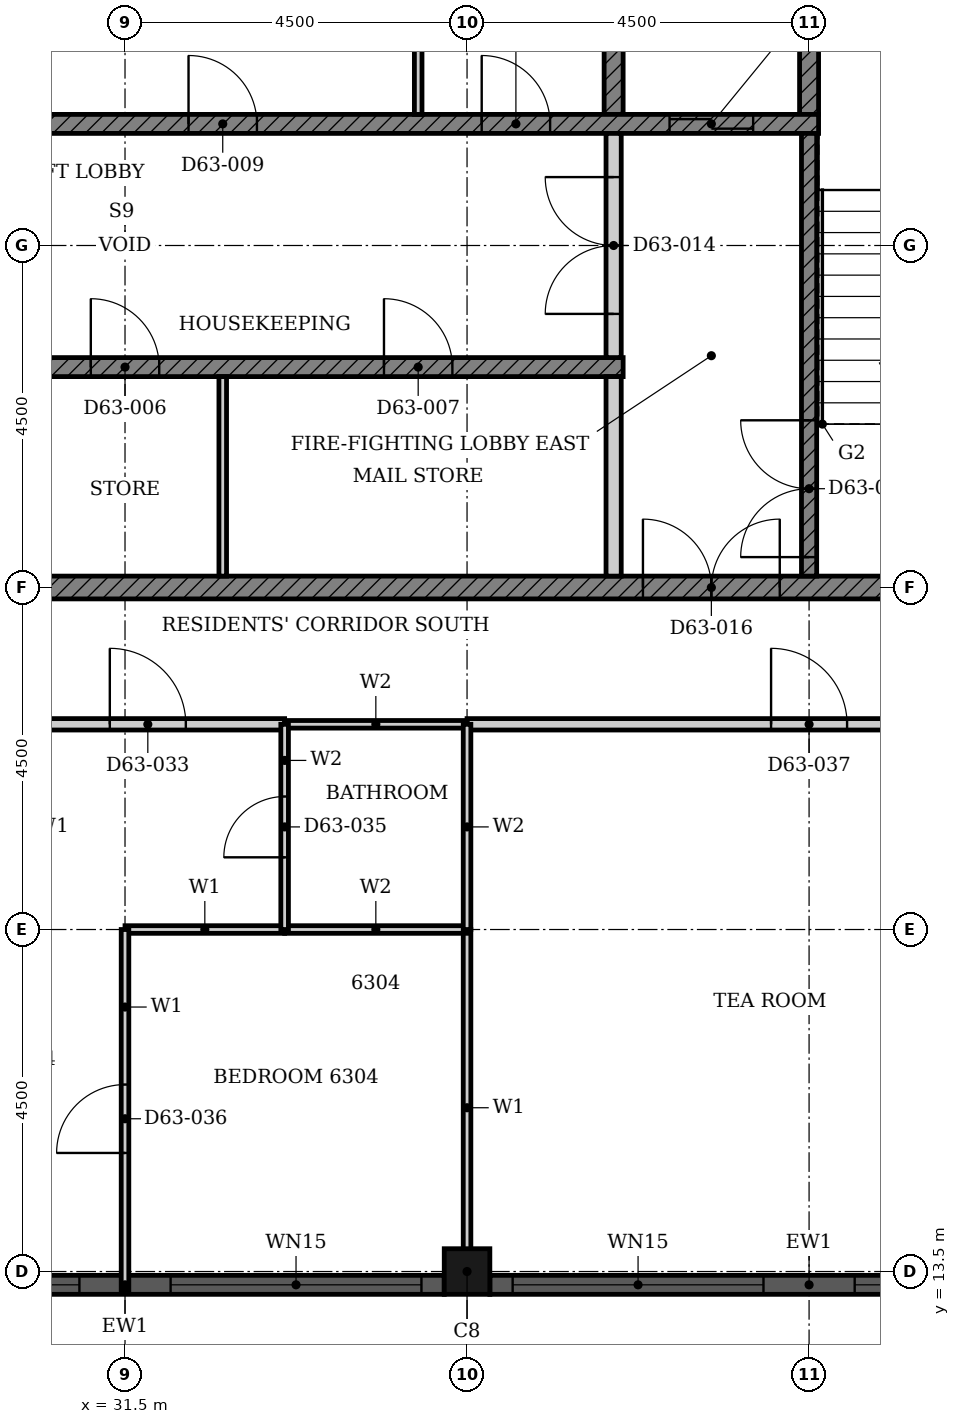
"""IFC4 building model, lengths in metres.
Left out: names, types, materials, properties, quantities, classifications, styles, units other than length and angle.
Written with IfcOpenShell. Run it as: python <this file> out.ifc"""

import sys

from ifc_helpers import new_model, si_unit, direction, frame, frame_2d, origin, origin_2d, place, context, subcontext, project, spatial, polyline, rectangle, hollow_rectangle, outline, extrude, element, fill, save


model = new_model("IFC4")
c1 = context("Model", 3, precision=1e-05, world=origin(), true_north=direction((0.0, 1.0)))
c2 = subcontext(c1, "Body", "Model", "MODEL_VIEW")
j1 = project(units=[si_unit("LENGTHUNIT", "METRE"), si_unit("PLANEANGLEUNIT", "RADIAN")], contexts=[c1])
p1 = place(None, origin())
s1 = spatial("IfcSite", under=j1, at=p1, CompositionType="ELEMENT")
p2 = place(p1, origin())
s2 = spatial("IfcBuilding", under=s1, at=p2, CompositionType="ELEMENT")
p3 = place(p2, frame((0.0, 0.0, 249.0)))
s3 = spatial("IfcBuildingStorey", under=s2, at=p3, CompositionType="ELEMENT", Elevation=249.0)
p4 = place(p3, frame((36.0, 13.5, 0.0), z_axis=(0.0, 0.0, 1.0), x_axis=(1.0, 0.0, 0.0)))
e1 = element("IfcColumn", 1, at=p4, inside=s3, PredefinedType="COLUMN", context=c2, shape_type="SweptSolid", body=[
    extrude(hollow_rectangle(XDim=0.6, YDim=0.6, WallThickness=0.02, at=origin_2d()), origin(), (0.0, 0.0, 1.0), 3.7),
])
p5 = place(p3, frame((27.3, 13.325, 0.0), z_axis=(0.0, 0.0, 1.0), x_axis=(1.0, 0.0, 0.0)))
e2 = element("IfcWall", 2, at=p5, inside=s3, PredefinedType="SOLIDWALL", context=c2, shape_type="SweptSolid", body=[
    extrude(rectangle(XDim=8.4, YDim=0.25, at=frame_2d((4.2, 0.0))), origin(), (0.0, 0.0, 1.0), 3.7),
])
p6 = place(p5, frame((0.3, 0.0, 0.45)))
e3 = element("IfcOpeningElement", 3, at=p6, cuts=e2, PredefinedType="OPENING", context=c2, shape_type="SweptSolid", body=[
    extrude(rectangle(XDim=3.3, YDim=2.3, at=frame_2d((1.65, 1.15))), frame((0.0, 0.135, 0.0), z_axis=(0.0, -1.0, 0.0), x_axis=(1.0, 0.0, 0.0)), (0.0, 0.0, 1.0), 0.27),
])
p7 = place(p5, frame((4.8, 0.0, 0.45)))
e4 = element("IfcOpeningElement", 4, at=p7, cuts=e2, PredefinedType="OPENING", context=c2, shape_type="SweptSolid", body=[
    extrude(rectangle(XDim=3.3, YDim=2.3, at=frame_2d((1.65, 1.15))), frame((0.0, 0.135, 0.0), z_axis=(0.0, -1.0, 0.0), x_axis=(1.0, 0.0, 0.0)), (0.0, 0.0, 1.0), 0.27),
])
p8 = place(p3, frame((36.3, 13.325, 0.0), z_axis=(0.0, 0.0, 1.0), x_axis=(1.0, 0.0, 0.0)))
e5 = element("IfcWall", 5, at=p8, inside=s3, PredefinedType="SOLIDWALL", context=c2, shape_type="SweptSolid", body=[
    extrude(rectangle(XDim=8.4, YDim=0.25, at=frame_2d((4.2, 0.0))), origin(), (0.0, 0.0, 1.0), 3.7),
])
p9 = place(p8, frame((0.3, 0.0, 0.45)))
e6 = element("IfcOpeningElement", 6, at=p9, cuts=e5, PredefinedType="OPENING", context=c2, shape_type="SweptSolid", body=[
    extrude(rectangle(XDim=3.3, YDim=2.3, at=frame_2d((1.65, 1.15))), frame((0.0, 0.135, 0.0), z_axis=(0.0, -1.0, 0.0), x_axis=(1.0, 0.0, 0.0)), (0.0, 0.0, 1.0), 0.27),
])
p10 = place(p8, frame((4.8, 0.0, 0.45)))
e7 = element("IfcOpeningElement", 7, at=p10, cuts=e5, PredefinedType="OPENING", context=c2, shape_type="SweptSolid", body=[
    extrude(rectangle(XDim=3.3, YDim=2.3, at=frame_2d((1.65, 1.15))), frame((0.0, 0.135, 0.0), z_axis=(0.0, -1.0, 0.0), x_axis=(1.0, 0.0, 0.0)), (0.0, 0.0, 1.0), 0.27),
])
p11 = place(p3, origin())
e8 = element("IfcWall", 8, at=p11, inside=s3, PredefinedType="SHEAR", context=c2, shape_type="SweptSolid", body=[
    extrude(outline(polyline([(37.803, 28.725), (38.053, 28.725), (38.053, 31.35), (40.375, 31.35), (40.375, 28.725), (40.625, 28.725), (40.625, 31.65), (37.803, 31.65), (37.803, 28.725)])), origin(), (0.0, 0.0, 1.0), 3.4),
])
p12 = place(p3, frame((30.339, 22.5, 0.0), z_axis=(0.0, 0.0, 1.0), x_axis=(1.0, 0.0, 0.0)))
e9 = element("IfcWall", 9, at=p12, inside=s3, PredefinedType="SHEAR", context=c2, shape_type="SweptSolid", body=[
    extrude(rectangle(XDim=14.511, YDim=0.3, at=frame_2d((7.255, 0.0))), origin(), (0.0, 0.0, 1.0), 3.4),
])
p13 = place(p12, frame((7.975, 0.0, 0.0)))
e10 = element("IfcOpeningElement", 10, at=p13, cuts=e9, PredefinedType="OPENING", context=c2, shape_type="SweptSolid", body=[
    extrude(rectangle(XDim=1.8, YDim=2.1, at=frame_2d((0.9, 1.05))), frame((0.0, 0.16, 0.0), z_axis=(0.0, -1.0, 0.0), x_axis=(1.0, 0.0, 0.0)), (0.0, 0.0, 1.0), 0.32),
])
p14 = place(p3, frame((22.375, 25.4, 0.0), z_axis=(0.0, 0.0, 1.0), x_axis=(1.0, 0.0, 0.0)))
e11 = element("IfcWall", 11, at=p14, inside=s3, PredefinedType="SHEAR", context=c2, shape_type="SweptSolid", body=[
    extrude(rectangle(XDim=15.678, YDim=0.25, at=frame_2d((7.839, 0.0))), origin(), (0.0, 0.0, 1.0), 3.4),
])
p15 = place(p14, frame((6.004, 0.0, 0.0)))
e12 = element("IfcOpeningElement", 12, at=p15, cuts=e11, PredefinedType="OPENING", context=c2, shape_type="SweptSolid", body=[
    extrude(rectangle(XDim=1.1, YDim=2.1, at=frame_2d((0.55, 1.05))), frame((0.0, 0.135, 0.0), z_axis=(0.0, -1.0, 0.0), x_axis=(1.0, 0.0, 0.0)), (0.0, 0.0, 1.0), 0.27),
])
p16 = place(p14, frame((0.861, 0.0, 0.0)))
e13 = element("IfcOpeningElement", 13, at=p16, cuts=e11, PredefinedType="OPENING", context=c2, shape_type="SweptSolid", body=[
    extrude(rectangle(XDim=1.1, YDim=2.1, at=frame_2d((0.55, 1.05))), frame((0.0, 0.135, 0.0), z_axis=(0.0, -1.0, 0.0), x_axis=(1.0, 0.0, 0.0)), (0.0, 0.0, 1.0), 0.27),
])
p17 = place(p14, frame((3.532, 0.0, 0.0)))
e14 = element("IfcOpeningElement", 14, at=p17, cuts=e11, PredefinedType="OPENING", context=c2, shape_type="SweptSolid", body=[
    extrude(rectangle(XDim=0.9, YDim=2.1, at=frame_2d((0.45, 1.05))), frame((0.0, 0.135, 0.0), z_axis=(0.0, -1.0, 0.0), x_axis=(1.0, 0.0, 0.0)), (0.0, 0.0, 1.0), 0.27),
])
p18 = place(p14, frame((8.675, 0.0, 0.0)))
e15 = element("IfcOpeningElement", 15, at=p18, cuts=e11, PredefinedType="OPENING", context=c2, shape_type="SweptSolid", body=[
    extrude(rectangle(XDim=0.9, YDim=2.1, at=frame_2d((0.45, 1.05))), frame((0.0, 0.135, 0.0), z_axis=(0.0, -1.0, 0.0), x_axis=(1.0, 0.0, 0.0)), (0.0, 0.0, 1.0), 0.27),
])
p19 = place(p14, frame((12.532, 0.0, 0.0)))
e16 = element("IfcOpeningElement", 16, at=p19, cuts=e11, PredefinedType="OPENING", context=c2, shape_type="SweptSolid", body=[
    extrude(rectangle(XDim=0.9, YDim=2.1, at=frame_2d((0.45, 1.05))), frame((0.0, 0.135, 0.0), z_axis=(0.0, -1.0, 0.0), x_axis=(1.0, 0.0, 0.0)), (0.0, 0.0, 1.0), 0.27),
])
p20 = place(p3, frame((24.947, 28.6, 0.0), z_axis=(0.0, 0.0, 1.0), x_axis=(1.0, 0.0, 0.0)))
e17 = element("IfcWall", 17, at=p20, inside=s3, PredefinedType="SHEAR", context=c2, shape_type="SweptSolid", body=[
    extrude(rectangle(XDim=15.678, YDim=0.25, at=frame_2d((7.839, 0.0))), origin(), (0.0, 0.0, 1.0), 3.4),
])
p21 = place(p20, frame((3.432, 0.0, 0.0)))
e18 = element("IfcOpeningElement", 18, at=p21, cuts=e17, PredefinedType="OPENING", context=c2, shape_type="SweptSolid", body=[
    extrude(rectangle(XDim=1.1, YDim=2.1, at=frame_2d((0.55, 1.05))), frame((0.0, 0.135, 0.0), z_axis=(0.0, -1.0, 0.0), x_axis=(1.0, 0.0, 0.0)), (0.0, 0.0, 1.0), 0.27),
])
p22 = place(p20, frame((13.718, 0.0, 0.0)))
e19 = element("IfcOpeningElement", 19, at=p22, cuts=e17, PredefinedType="OPENING", context=c2, shape_type="SweptSolid", body=[
    extrude(rectangle(XDim=1.1, YDim=2.1, at=frame_2d((0.55, 1.05))), frame((0.0, 0.135, 0.0), z_axis=(0.0, -1.0, 0.0), x_axis=(1.0, 0.0, 0.0)), (0.0, 0.0, 1.0), 0.27),
])
p23 = place(p20, frame((0.961, 0.0, 0.0)))
e20 = element("IfcOpeningElement", 20, at=p23, cuts=e17, PredefinedType="OPENING", context=c2, shape_type="SweptSolid", body=[
    extrude(rectangle(XDim=0.9, YDim=2.1, at=frame_2d((0.45, 1.05))), frame((0.0, 0.135, 0.0), z_axis=(0.0, -1.0, 0.0), x_axis=(1.0, 0.0, 0.0)), (0.0, 0.0, 1.0), 0.27),
])
p24 = place(p20, frame((7.389, 0.0, 0.0)))
e21 = element("IfcOpeningElement", 21, at=p24, cuts=e17, PredefinedType="OPENING", context=c2, shape_type="SweptSolid", body=[
    extrude(rectangle(XDim=0.9, YDim=2.1, at=frame_2d((0.45, 1.05))), frame((0.0, 0.135, 0.0), z_axis=(0.0, -1.0, 0.0), x_axis=(1.0, 0.0, 0.0)), (0.0, 0.0, 1.0), 0.27),
])
p25 = place(p20, frame((11.246, 0.0, 0.0)))
e22 = element("IfcOpeningElement", 22, at=p25, cuts=e17, PredefinedType="OPENING", context=c2, shape_type="SweptSolid", body=[
    extrude(rectangle(XDim=0.9, YDim=2.1, at=frame_2d((0.45, 1.05))), frame((0.0, 0.135, 0.0), z_axis=(0.0, -1.0, 0.0), x_axis=(1.0, 0.0, 0.0)), (0.0, 0.0, 1.0), 0.27),
])
p26 = place(p3, frame((37.928, 22.65, 0.0), z_axis=(0.0, 0.0, 1.0), x_axis=(0.0, 1.0, 0.0)))
e23 = element("IfcWall", 23, at=p26, inside=s3, PredefinedType="PARTITIONING", context=c2, shape_type="SweptSolid", body=[
    extrude(rectangle(XDim=2.625, YDim=0.2, at=frame_2d((1.312, 0.0))), origin(), (0.0, 0.0, 1.0), 3.4),
])
for number, where, z_axis, x_axis in (
    (24, (32.786, 22.65, 0.0), (0.0, 0.0, 1.0), (0.0, 1.0, 0.0)),
    (25, (35.357, 28.725, 0.0), (0.0, 0.0, 1.0), (0.0, 1.0, 0.0)),
):
    element("IfcWall", number, at=place(p3, frame(where, z_axis=z_axis, x_axis=x_axis)), inside=s3, PredefinedType="PARTITIONING", context=c2, shape_type="SweptSolid", body=[
        extrude(rectangle(XDim=2.625, YDim=0.1, at=frame_2d((1.312, 0.0))), origin(), (0.0, 0.0, 1.0), 3.4),
    ])
p27 = place(p3, frame((40.5, 22.65, 0.0), z_axis=(0.0, 0.0, 1.0), x_axis=(0.0, 1.0, 0.0)))
e26 = element("IfcWall", 26, at=p27, inside=s3, PredefinedType="SHEAR", context=c2, shape_type="SweptSolid", body=[
    extrude(rectangle(XDim=5.825, YDim=0.2, at=frame_2d((2.913, 0.0))), origin(), (0.0, 0.0, 1.0), 3.4),
])
p28 = place(p27, frame((0.25, 0.0, 0.0)))
e27 = element("IfcOpeningElement", 27, at=p28, cuts=e26, PredefinedType="OPENING", context=c2, shape_type="SweptSolid", body=[
    extrude(rectangle(XDim=1.8, YDim=2.1, at=frame_2d((0.9, 1.05))), frame((0.0, 0.11, 0.0), z_axis=(0.0, -1.0, 0.0), x_axis=(1.0, 0.0, 0.0)), (0.0, 0.0, 1.0), 0.22),
])
p29 = place(p3, frame((37.928, 25.525, 0.0), z_axis=(0.0, 0.0, 1.0), x_axis=(0.0, 1.0, 0.0)))
e28 = element("IfcWall", 28, at=p29, inside=s3, PredefinedType="PARTITIONING", context=c2, shape_type="SweptSolid", body=[
    extrude(rectangle(XDim=2.95, YDim=0.2, at=frame_2d((1.475, 0.0))), origin(), (0.0, 0.0, 1.0), 3.4),
])
p30 = place(p29, frame((0.575, 0.0, 0.0)))
e29 = element("IfcOpeningElement", 29, at=p30, cuts=e28, PredefinedType="OPENING", context=c2, shape_type="SweptSolid", body=[
    extrude(rectangle(XDim=1.8, YDim=2.1, at=frame_2d((0.9, 1.05))), frame((0.0, 0.11, 0.0), z_axis=(0.0, -1.0, 0.0), x_axis=(1.0, 0.0, 0.0)), (0.0, 0.0, 1.0), 0.22),
])
p31 = place(p3, frame((27.0, 20.7, 0.0), z_axis=(0.0, 0.0, 1.0), x_axis=(1.0, 0.0, 0.0)))
e30 = element("IfcWall", 30, at=p31, inside=s3, PredefinedType="PARTITIONING", context=c2, shape_type="SweptSolid", body=[
    extrude(rectangle(XDim=6.6, YDim=0.15, at=frame_2d((3.3, 0.0))), origin(), (0.0, 0.0, 1.0), 3.4),
])
p32 = place(p31, frame((4.3, 0.0, 0.0)))
e31 = element("IfcOpeningElement", 31, at=p32, cuts=e30, PredefinedType="OPENING", context=c2, shape_type="SweptSolid", body=[
    extrude(rectangle(XDim=1.0, YDim=2.2, at=frame_2d((0.5, 1.1))), frame((0.0, 0.085, 0.0), z_axis=(0.0, -1.0, 0.0), x_axis=(1.0, 0.0, 0.0)), (0.0, 0.0, 1.0), 0.17),
])
p33 = place(p3, frame((36.0, 20.7, 0.0), z_axis=(0.0, 0.0, 1.0), x_axis=(1.0, 0.0, 0.0)))
e32 = element("IfcWall", 32, at=p33, inside=s3, PredefinedType="PARTITIONING", context=c2, shape_type="SweptSolid", body=[
    extrude(rectangle(XDim=13.55, YDim=0.15, at=frame_2d((6.775, 0.0))), origin(), (0.0, 0.0, 1.0), 3.4),
])
p34 = place(p33, frame((4.0, 0.0, 0.0)))
e33 = element("IfcOpeningElement", 33, at=p34, cuts=e32, PredefinedType="OPENING", context=c2, shape_type="SweptSolid", body=[
    extrude(rectangle(XDim=1.0, YDim=2.1, at=frame_2d((0.5, 1.05))), frame((0.0, 0.085, 0.0), z_axis=(0.0, -1.0, 0.0), x_axis=(1.0, 0.0, 0.0)), (0.0, 0.0, 1.0), 0.17),
])
p35 = place(p3, frame((31.5, 18.0, 0.0), z_axis=(0.0, 0.0, 1.0), x_axis=(1.0, 0.0, 0.0)))
e34 = element("IfcWall", 34, at=p35, inside=s3, PredefinedType="PARTITIONING", context=c2, shape_type="SweptSolid", body=[
    extrude(rectangle(XDim=2.1, YDim=0.1, at=frame_2d((1.05, 0.0))), origin(), (0.0, 0.0, 1.0), 3.4),
])
p36 = place(p3, frame((31.5, 13.26, 0.0), z_axis=(0.0, 0.0, 1.0), x_axis=(0.0, 1.0, 0.0)))
e35 = element("IfcWall", 35, at=p36, inside=s3, PredefinedType="PARTITIONING", context=c2, shape_type="SweptSolid", body=[
    extrude(rectangle(XDim=4.74, YDim=0.1, at=frame_2d((2.37, 0.0))), origin(), (0.0, 0.0, 1.0), 3.4),
])
p37 = place(p36, frame((1.8, 0.0, 0.0)))
e36 = element("IfcOpeningElement", 36, at=p37, cuts=e35, PredefinedType="OPENING", context=c2, shape_type="SweptSolid", body=[
    extrude(rectangle(XDim=0.9, YDim=2.1, at=frame_2d((0.45, 1.05))), frame((0.0, 0.06, 0.0), z_axis=(0.0, -1.0, 0.0), x_axis=(1.0, 0.0, 0.0)), (0.0, 0.0, 1.0), 0.12),
])
p38 = place(p3, frame((36.0, 13.31, 0.0), z_axis=(0.0, 0.0, 1.0), x_axis=(0.0, 1.0, 0.0)))
e37 = element("IfcWall", 37, at=p38, inside=s3, PredefinedType="PARTITIONING", context=c2, shape_type="SweptSolid", body=[
    extrude(rectangle(XDim=4.69, YDim=0.1, at=frame_2d((2.345, 0.0))), origin(), (0.0, 0.0, 1.0), 3.4),
])
for number, where, z_axis, x_axis in (
    (38, (33.6, 18.0, 0.0), (0.0, 0.0, 1.0), (1.0, 0.0, 0.0)),
    (39, (33.6, 20.7, 0.0), (0.0, 0.0, 1.0), (1.0, 0.0, 0.0)),
):
    element("IfcWall", number, at=place(p3, frame(where, z_axis=z_axis, x_axis=x_axis)), inside=s3, PredefinedType="PARTITIONING", context=c2, shape_type="SweptSolid", body=[
        extrude(rectangle(XDim=2.4, YDim=0.1, at=frame_2d((1.2, 0.0))), origin(), (0.0, 0.0, 1.0), 3.4),
    ])
p39 = place(p3, frame((33.6, 18.0, 0.0), z_axis=(0.0, 0.0, 1.0), x_axis=(0.0, 1.0, 0.0)))
e40 = element("IfcWall", 40, at=p39, inside=s3, PredefinedType="PARTITIONING", context=c2, shape_type="SweptSolid", body=[
    extrude(rectangle(XDim=2.7, YDim=0.1, at=frame_2d((1.35, 0.0))), origin(), (0.0, 0.0, 1.0), 3.4),
])
p40 = place(p39, frame((0.95, 0.0, 0.0)))
e41 = element("IfcOpeningElement", 41, at=p40, cuts=e40, PredefinedType="OPENING", context=c2, shape_type="SweptSolid", body=[
    extrude(rectangle(XDim=0.8, YDim=2.1, at=frame_2d((0.4, 1.05))), frame((0.0, 0.06, 0.0), z_axis=(0.0, -1.0, 0.0), x_axis=(1.0, 0.0, 0.0)), (0.0, 0.0, 1.0), 0.12),
])
p41 = place(p3, frame((36.0, 18.0, 0.0), z_axis=(0.0, 0.0, 1.0), x_axis=(0.0, 1.0, 0.0)))
e42 = element("IfcWall", 42, at=p41, inside=s3, PredefinedType="PARTITIONING", context=c2, shape_type="SweptSolid", body=[
    extrude(rectangle(XDim=2.7, YDim=0.1, at=frame_2d((1.35, 0.0))), origin(), (0.0, 0.0, 1.0), 3.4),
])
p42 = place(p6, origin())
e43 = element("IfcWindow", 43, at=p42, inside=s3, PartitioningType="SINGLE_PANEL", PredefinedType="WINDOW", context=c2, shape_type="SweptSolid", body=[
    extrude(rectangle(XDim=3.3, YDim=2.3, at=frame_2d((1.65, 1.15))), frame((0.0, 0.03, 0.0), z_axis=(0.0, -1.0, 0.0), x_axis=(1.0, 0.0, 0.0)), (0.0, 0.0, 1.0), 0.06),
])
fill(e3, e43)
p43 = place(p7, origin())
e44 = element("IfcWindow", 44, at=p43, inside=s3, PartitioningType="SINGLE_PANEL", PredefinedType="WINDOW", context=c2, shape_type="SweptSolid", body=[
    extrude(rectangle(XDim=3.3, YDim=2.3, at=frame_2d((1.65, 1.15))), frame((0.0, 0.03, 0.0), z_axis=(0.0, -1.0, 0.0), x_axis=(1.0, 0.0, 0.0)), (0.0, 0.0, 1.0), 0.06),
])
fill(e4, e44)
p44 = place(p9, origin())
e45 = element("IfcWindow", 45, at=p44, inside=s3, PartitioningType="SINGLE_PANEL", PredefinedType="WINDOW", context=c2, shape_type="SweptSolid", body=[
    extrude(rectangle(XDim=3.3, YDim=2.3, at=frame_2d((1.65, 1.15))), frame((0.0, 0.03, 0.0), z_axis=(0.0, -1.0, 0.0), x_axis=(1.0, 0.0, 0.0)), (0.0, 0.0, 1.0), 0.06),
])
fill(e6, e45)
p45 = place(p10, origin())
e46 = element("IfcWindow", 46, at=p45, inside=s3, PartitioningType="SINGLE_PANEL", PredefinedType="WINDOW", context=c2, shape_type="SweptSolid", body=[
    extrude(rectangle(XDim=3.3, YDim=2.3, at=frame_2d((1.65, 1.15))), frame((0.0, 0.03, 0.0), z_axis=(0.0, -1.0, 0.0), x_axis=(1.0, 0.0, 0.0)), (0.0, 0.0, 1.0), 0.06),
])
fill(e7, e46)
p46 = place(p22, origin())
e47 = element("IfcDoor", 47, at=p46, inside=s3, OperationType="DOUBLE_DOOR_SLIDING", PredefinedType="DOOR", context=c2, shape_type="SweptSolid", body=[
    extrude(rectangle(XDim=1.1, YDim=2.1, at=frame_2d((0.55, 1.05))), frame((0.0, 0.025, 0.0), z_axis=(0.0, -1.0, 0.0), x_axis=(1.0, 0.0, 0.0)), (0.0, 0.0, 1.0), 0.05),
])
fill(e19, e47)
p47 = place(p18, origin())
e48 = element("IfcDoor", 48, at=p47, inside=s3, OperationType="SINGLE_SWING_LEFT", PredefinedType="DOOR", context=c2, shape_type="SweptSolid", body=[
    extrude(rectangle(XDim=0.9, YDim=2.1, at=frame_2d((0.45, 1.05))), frame((0.0, 0.025, 0.0), z_axis=(0.0, -1.0, 0.0), x_axis=(1.0, 0.0, 0.0)), (0.0, 0.0, 1.0), 0.05),
])
fill(e15, e48)
p48 = place(p19, origin())
e49 = element("IfcDoor", 49, at=p48, inside=s3, OperationType="SINGLE_SWING_LEFT", PredefinedType="DOOR", context=c2, shape_type="SweptSolid", body=[
    extrude(rectangle(XDim=0.9, YDim=2.1, at=frame_2d((0.45, 1.05))), frame((0.0, 0.025, 0.0), z_axis=(0.0, -1.0, 0.0), x_axis=(1.0, 0.0, 0.0)), (0.0, 0.0, 1.0), 0.05),
])
fill(e16, e49)
p49 = place(p24, origin())
e50 = element("IfcDoor", 50, at=p49, inside=s3, OperationType="SINGLE_SWING_LEFT", PredefinedType="DOOR", context=c2, shape_type="SweptSolid", body=[
    extrude(rectangle(XDim=0.9, YDim=2.1, at=frame_2d((0.45, 1.05))), frame((0.0, 0.025, 0.0), z_axis=(0.0, -1.0, 0.0), x_axis=(1.0, 0.0, 0.0)), (0.0, 0.0, 1.0), 0.05),
])
fill(e21, e50)
p50 = place(p25, origin())
e51 = element("IfcDoor", 51, at=p50, inside=s3, OperationType="SINGLE_SWING_LEFT", PredefinedType="DOOR", context=c2, shape_type="SweptSolid", body=[
    extrude(rectangle(XDim=0.9, YDim=2.1, at=frame_2d((0.45, 1.05))), frame((0.0, 0.025, 0.0), z_axis=(0.0, -1.0, 0.0), x_axis=(1.0, 0.0, 0.0)), (0.0, 0.0, 1.0), 0.05),
])
fill(e22, e51)
p51 = place(p28, origin())
e52 = element("IfcDoor", 52, at=p51, inside=s3, OperationType="DOUBLE_DOOR_SINGLE_SWING", PredefinedType="DOOR", context=c2, shape_type="SweptSolid", body=[
    extrude(rectangle(XDim=1.8, YDim=2.1, at=frame_2d((0.9, 1.05))), frame((0.0, 0.025, 0.0), z_axis=(0.0, -1.0, 0.0), x_axis=(1.0, 0.0, 0.0)), (0.0, 0.0, 1.0), 0.05),
])
fill(e27, e52)
p52 = place(p30, origin())
e53 = element("IfcDoor", 53, at=p52, inside=s3, OperationType="DOUBLE_DOOR_SINGLE_SWING", PredefinedType="DOOR", context=c2, shape_type="SweptSolid", body=[
    extrude(rectangle(XDim=1.8, YDim=2.1, at=frame_2d((0.9, 1.05))), frame((0.0, 0.025, 0.0), z_axis=(0.0, -1.0, 0.0), x_axis=(1.0, 0.0, 0.0)), (0.0, 0.0, 1.0), 0.05),
])
fill(e29, e53)
p53 = place(p13, origin())
e54 = element("IfcDoor", 54, at=p53, inside=s3, OperationType="DOUBLE_DOOR_SINGLE_SWING", PredefinedType="DOOR", context=c2, shape_type="SweptSolid", body=[
    extrude(rectangle(XDim=1.8, YDim=2.1, at=frame_2d((0.9, 1.05))), frame((0.0, 0.025, 0.0), z_axis=(0.0, -1.0, 0.0), x_axis=(1.0, 0.0, 0.0)), (0.0, 0.0, 1.0), 0.05),
])
fill(e10, e54)
p54 = place(p32, origin())
e55 = element("IfcDoor", 55, at=p54, inside=s3, OperationType="SINGLE_SWING_LEFT", PredefinedType="DOOR", context=c2, shape_type="SweptSolid", body=[
    extrude(rectangle(XDim=1.0, YDim=2.2, at=frame_2d((0.5, 1.1))), frame((0.0, 0.025, 0.0), z_axis=(0.0, -1.0, 0.0), x_axis=(1.0, 0.0, 0.0)), (0.0, 0.0, 1.0), 0.05),
])
fill(e31, e55)
p55 = place(p40, origin())
e56 = element("IfcDoor", 56, at=p55, inside=s3, OperationType="SINGLE_SWING_RIGHT", PredefinedType="DOOR", context=c2, shape_type="SweptSolid", body=[
    extrude(rectangle(XDim=0.8, YDim=2.1, at=frame_2d((0.4, 1.05))), frame((0.0, 0.025, 0.0), z_axis=(0.0, -1.0, 0.0), x_axis=(1.0, 0.0, 0.0)), (0.0, 0.0, 1.0), 0.05),
])
fill(e41, e56)
p56 = place(p37, origin())
e57 = element("IfcDoor", 57, at=p56, inside=s3, OperationType="SINGLE_SWING_LEFT", PredefinedType="DOOR", context=c2, shape_type="SweptSolid", body=[
    extrude(rectangle(XDim=0.9, YDim=2.1, at=frame_2d((0.45, 1.05))), frame((0.0, 0.025, 0.0), z_axis=(0.0, -1.0, 0.0), x_axis=(1.0, 0.0, 0.0)), (0.0, 0.0, 1.0), 0.05),
])
fill(e36, e57)
p57 = place(p34, origin())
e58 = element("IfcDoor", 58, at=p57, inside=s3, OperationType="SINGLE_SWING_RIGHT", PredefinedType="DOOR", context=c2, shape_type="SweptSolid", body=[
    extrude(rectangle(XDim=1.0, YDim=2.1, at=frame_2d((0.5, 1.05))), frame((0.0, 0.025, 0.0), z_axis=(0.0, -1.0, 0.0), x_axis=(1.0, 0.0, 0.0)), (0.0, 0.0, 1.0), 0.05),
])
fill(e33, e58)
save(model, sys.argv[1])
